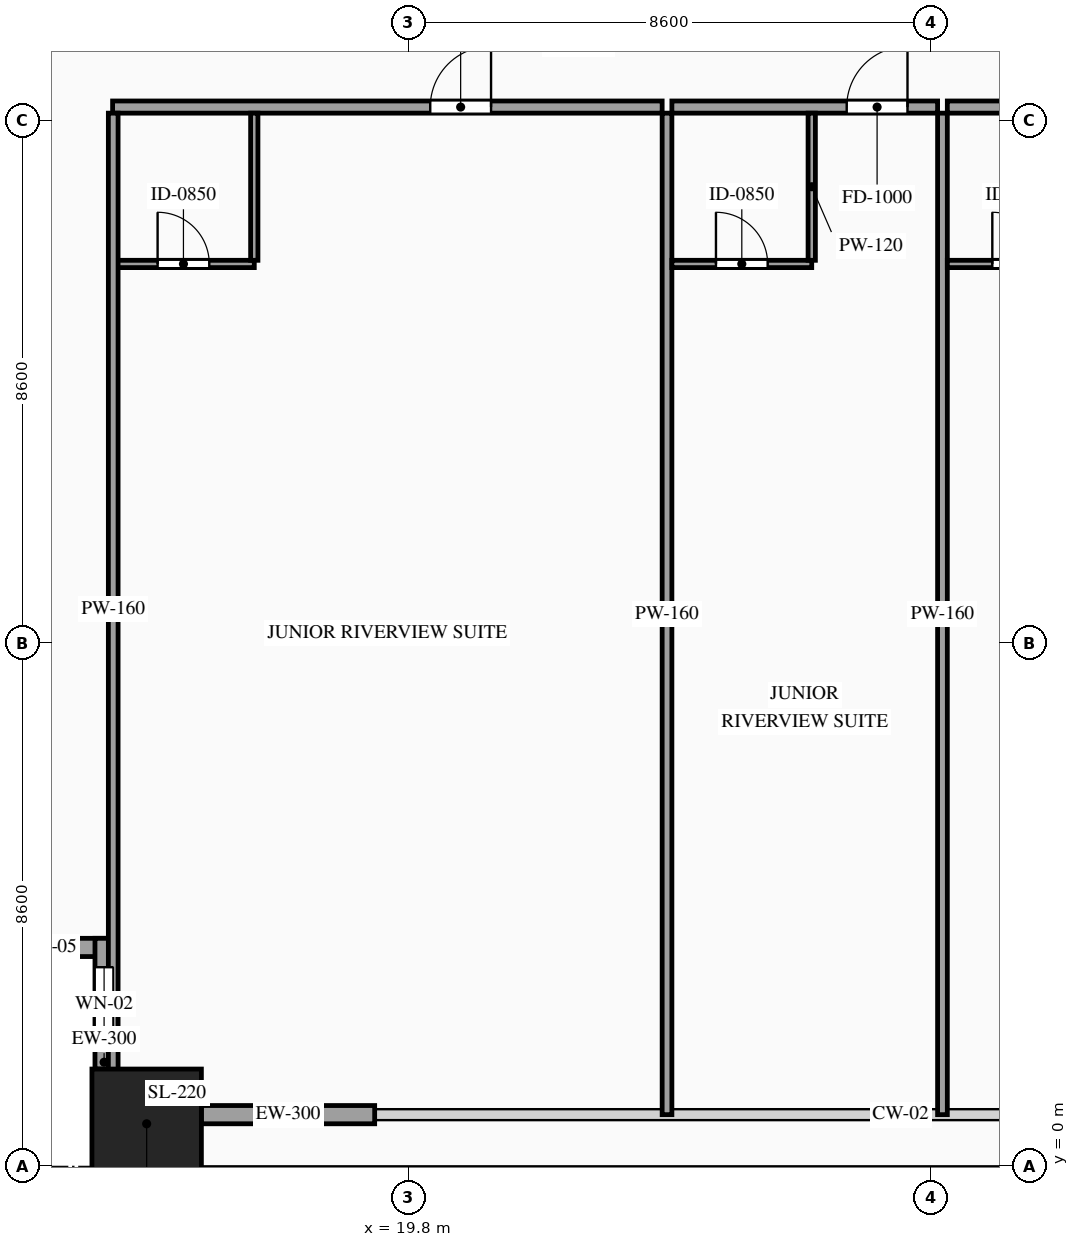
"""IFC4 building model, lengths in metres.
Left out: names, types, materials, properties, quantities, classifications, styles, units other than length and angle.
Written with IfcOpenShell. Run it as: python <this file> out.ifc"""

import sys

from ifc_helpers import new_model, si_unit, direction, frame, frame_2d, origin, origin_2d, place, context, subcontext, project, spatial, rectangle, hollow_rectangle, extrude, source, transform, mapped, element, fill, save


model = new_model("IFC4")
c1 = context("Model", 3, precision=1e-05, world=origin(), true_north=direction((0.0, 1.0)))
c2 = subcontext(c1, "Body", "Model", "MODEL_VIEW")
j1 = project(units=[si_unit("LENGTHUNIT", "METRE"), si_unit("PLANEANGLEUNIT", "RADIAN")], contexts=[c1])
p1 = place(None, origin())
s1 = spatial("IfcSite", under=j1, at=p1, CompositionType="ELEMENT")
p2 = place(p1, origin())
s2 = spatial("IfcBuilding", under=s1, at=p2, CompositionType="ELEMENT")
p3 = place(p2, frame((0.0, 0.0, 74.8)))
s3 = spatial("IfcBuildingStorey", under=s2, at=p3, CompositionType="ELEMENT", Elevation=74.8)
m1 = source(origin(), c2, "Body", "SweptSolid", [
    extrude(hollow_rectangle(XDim=1.8, YDim=1.8, WallThickness=0.08, at=origin_2d()), origin(), (0.0, 0.0, 1.0), 3.6),
])
p4 = place(p3, frame((15.5, 0.7, 0.0), z_axis=(0.0, 0.0, 1.0), x_axis=(1.0, 0.0, 0.0)))
e1 = element("IfcColumn", 1, at=p4, inside=s3, PredefinedType="COLUMN", context=c2, shape_type="MappedRepresentation", body=[
    mapped(m1, transform((0.0, 0.0, 0.0), scale=1.0)),
])
p5 = place(p3, frame((12.8, 3.6, 0.0), z_axis=(0.0, 0.0, 1.0), x_axis=(1.0, 0.0, 0.0)))
e2 = element("IfcWall", 2, at=p5, inside=s3, PredefinedType="SOLIDWALL", context=c2, shape_type="SweptSolid", body=[
    extrude(rectangle(XDim=2.15, YDim=0.3, at=frame_2d((1.075, 0.0))), origin(), (0.0, 0.0, 1.0), 3.38),
])
p6 = place(p5, frame((0.625, 0.0, 0.85)))
e3 = element("IfcOpeningElement", 3, at=p6, cuts=e2, PredefinedType="OPENING", context=c2, shape_type="SweptSolid", body=[
    extrude(rectangle(XDim=0.9, YDim=1.5, at=frame_2d((0.45, 0.75))), frame((0.0, 0.165, 0.0), z_axis=(0.0, -1.0, 0.0), x_axis=(1.0, 0.0, 0.0)), (0.0, 0.0, 1.0), 0.33),
])
p7 = place(p3, frame((14.8, 3.75, 0.0), z_axis=(0.0, 0.0, 1.0), x_axis=(0.0, -1.0, 0.0)))
e4 = element("IfcWall", 4, at=p7, inside=s3, PredefinedType="SOLIDWALL", context=c2, shape_type="SweptSolid", body=[
    extrude(rectangle(XDim=2.15, YDim=0.3, at=frame_2d((1.075, 0.0))), origin(), (0.0, 0.0, 1.0), 3.38),
])
p8 = place(p7, frame((0.475, 0.0, 0.85)))
e5 = element("IfcOpeningElement", 5, at=p8, cuts=e4, PredefinedType="OPENING", context=c2, shape_type="SweptSolid", body=[
    extrude(rectangle(XDim=1.2, YDim=2.1, at=frame_2d((0.6, 1.05))), frame((0.0, 0.165, 0.0), z_axis=(0.0, -1.0, 0.0), x_axis=(1.0, 0.0, 0.0)), (0.0, 0.0, 1.0), 0.33),
])
m2 = source(origin(), c2, "Body", "SweptSolid", [
    extrude(rectangle(XDim=2.85, YDim=0.3, at=frame_2d((1.425, 0.0))), origin(), (0.0, 0.0, 1.0), 2.775),
])
p9 = place(p3, frame((16.4, 0.85, 0.0), z_axis=(0.0, 0.0, 1.0), x_axis=(1.0, 0.0, 0.0)))
e6 = element("IfcWall", 6, at=p9, inside=s3, PredefinedType="SOLIDWALL", context=c2, shape_type="MappedRepresentation", body=[
    mapped(m2, transform((0.0, 0.0, 0.0), scale=1.0)),
])
p10 = place(p3, frame((14.94, 17.42, 0.0), z_axis=(0.0, 0.0, 1.0), x_axis=(1.0, 0.0, 0.0)))
e7 = element("IfcWall", 7, at=p10, inside=s3, PredefinedType="PARTITIONING", context=c2, shape_type="SweptSolid", body=[
    extrude(rectangle(XDim=9.038, YDim=0.2, at=frame_2d((4.519, 0.0))), origin(), (0.0, 0.0, 1.0), 3.38),
])
p11 = place(p10, frame((5.224, 0.0, 0.0)))
e8 = element("IfcOpeningElement", 8, at=p11, cuts=e7, PredefinedType="OPENING", context=c2, shape_type="SweptSolid", body=[
    extrude(rectangle(XDim=1.0, YDim=2.2, at=frame_2d((0.5, 1.1))), frame((0.0, 0.115, 0.0), z_axis=(0.0, -1.0, 0.0), x_axis=(1.0, 0.0, 0.0)), (0.0, 0.0, 1.0), 0.23),
])
m3 = source(origin(), c2, "Body", "SweptSolid", [
    extrude(rectangle(XDim=16.47, YDim=0.16, at=frame_2d((8.235, 0.0))), origin(), (0.0, 0.0, 1.0), 3.38),
])
p12 = place(p3, frame((24.058, 0.85, 0.0), z_axis=(0.0, 0.0, 1.0), x_axis=(0.0, 1.0, 0.0)))
e9 = element("IfcWall", 9, at=p12, inside=s3, PredefinedType="PARTITIONING", context=c2, shape_type="MappedRepresentation", body=[
    mapped(m3, transform((0.0, 0.0, 0.0), scale=1.0)),
])
p13 = place(p3, frame((14.94, 14.84, 0.0), z_axis=(0.0, 0.0, 1.0), x_axis=(1.0, 0.0, 0.0)))
e10 = element("IfcWall", 10, at=p13, inside=s3, PredefinedType="PARTITIONING", context=c2, shape_type="SweptSolid", body=[
    extrude(rectangle(XDim=2.33, YDim=0.12, at=frame_2d((1.165, 0.0))), origin(), (0.0, 0.0, 1.0), 3.38),
])
p14 = place(p13, frame((0.74, 0.0, 0.0)))
e11 = element("IfcOpeningElement", 11, at=p14, cuts=e10, PredefinedType="OPENING", context=c2, shape_type="SweptSolid", body=[
    extrude(rectangle(XDim=0.85, YDim=2.1, at=frame_2d((0.425, 1.05))), frame((0.0, 0.075, 0.0), z_axis=(0.0, -1.0, 0.0), x_axis=(1.0, 0.0, 0.0)), (0.0, 0.0, 1.0), 0.15),
])
m4 = source(origin(), c2, "Body", "SweptSolid", [
    extrude(rectangle(XDim=2.42, YDim=0.12, at=frame_2d((1.21, 0.0))), origin(), (0.0, 0.0, 1.0), 3.38),
])
p15 = place(p3, frame((17.27, 14.9, 0.0), z_axis=(0.0, 0.0, 1.0), x_axis=(0.0, 1.0, 0.0)))
e12 = element("IfcWall", 12, at=p15, inside=s3, PredefinedType="PARTITIONING", context=c2, shape_type="MappedRepresentation", body=[
    mapped(m4, transform((0.0, 0.0, 0.0), scale=1.0)),
])
p16 = place(p3, frame((24.138, 17.42, 0.0), z_axis=(0.0, 0.0, 1.0), x_axis=(1.0, 0.0, 0.0)))
e13 = element("IfcWall", 13, at=p16, inside=s3, PredefinedType="PARTITIONING", context=c2, shape_type="SweptSolid", body=[
    extrude(rectangle(XDim=4.37, YDim=0.2, at=frame_2d((2.185, 0.0))), origin(), (0.0, 0.0, 1.0), 3.38),
])
p17 = place(p16, frame((2.875, 0.0, 0.0)))
e14 = element("IfcOpeningElement", 14, at=p17, cuts=e13, PredefinedType="OPENING", context=c2, shape_type="SweptSolid", body=[
    extrude(rectangle(XDim=1.0, YDim=2.2, at=frame_2d((0.5, 1.1))), frame((0.0, 0.115, 0.0), z_axis=(0.0, -1.0, 0.0), x_axis=(1.0, 0.0, 0.0)), (0.0, 0.0, 1.0), 0.23),
])
p18 = place(p3, frame((28.588, 0.85, 0.0), z_axis=(0.0, 0.0, 1.0), x_axis=(0.0, 1.0, 0.0)))
e15 = element("IfcWall", 15, at=p18, inside=s3, PredefinedType="PARTITIONING", context=c2, shape_type="MappedRepresentation", body=[
    mapped(m3, transform((0.0, 0.0, 0.0), scale=1.0)),
])
p19 = place(p3, frame((24.138, 14.84, 0.0), z_axis=(0.0, 0.0, 1.0), x_axis=(1.0, 0.0, 0.0)))
e16 = element("IfcWall", 16, at=p19, inside=s3, PredefinedType="PARTITIONING", context=c2, shape_type="SweptSolid", body=[
    extrude(rectangle(XDim=2.3, YDim=0.12, at=frame_2d((1.15, 0.0))), origin(), (0.0, 0.0, 1.0), 3.38),
])
p20 = place(p19, frame((0.725, 0.0, 0.0)))
e17 = element("IfcOpeningElement", 17, at=p20, cuts=e16, PredefinedType="OPENING", context=c2, shape_type="SweptSolid", body=[
    extrude(rectangle(XDim=0.85, YDim=2.1, at=frame_2d((0.425, 1.05))), frame((0.0, 0.075, 0.0), z_axis=(0.0, -1.0, 0.0), x_axis=(1.0, 0.0, 0.0)), (0.0, 0.0, 1.0), 0.15),
])
p21 = place(p3, frame((26.438, 14.9, 0.0), z_axis=(0.0, 0.0, 1.0), x_axis=(0.0, 1.0, 0.0)))
e18 = element("IfcWall", 18, at=p21, inside=s3, PredefinedType="PARTITIONING", context=c2, shape_type="MappedRepresentation", body=[
    mapped(m4, transform((0.0, 0.0, 0.0), scale=1.0)),
])
p22 = place(p3, frame((28.668, 17.42, 0.0), z_axis=(0.0, 0.0, 1.0), x_axis=(1.0, 0.0, 0.0)))
e19 = element("IfcWall", 19, at=p22, inside=s3, PredefinedType="PARTITIONING", context=c2, shape_type="SweptSolid", body=[
    extrude(rectangle(XDim=10.017, YDim=0.2, at=frame_2d((5.009, 0.0))), origin(), (0.0, 0.0, 1.0), 3.38),
])
p23 = place(p22, frame((5.714, 0.0, 0.0)))
e20 = element("IfcOpeningElement", 20, at=p23, cuts=e19, PredefinedType="OPENING", context=c2, shape_type="SweptSolid", body=[
    extrude(rectangle(XDim=1.0, YDim=2.2, at=frame_2d((0.5, 1.1))), frame((0.0, 0.115, 0.0), z_axis=(0.0, -1.0, 0.0), x_axis=(1.0, 0.0, 0.0)), (0.0, 0.0, 1.0), 0.23),
])
p24 = place(p3, frame((28.668, 14.84, 0.0), z_axis=(0.0, 0.0, 1.0), x_axis=(1.0, 0.0, 0.0)))
e21 = element("IfcWall", 21, at=p24, inside=s3, PredefinedType="PARTITIONING", context=c2, shape_type="SweptSolid", body=[
    extrude(rectangle(XDim=2.33, YDim=0.12, at=frame_2d((1.165, 0.0))), origin(), (0.0, 0.0, 1.0), 3.38),
])
p25 = place(p24, frame((0.74, 0.0, 0.0)))
e22 = element("IfcOpeningElement", 22, at=p25, cuts=e21, PredefinedType="OPENING", context=c2, shape_type="SweptSolid", body=[
    extrude(rectangle(XDim=0.85, YDim=2.1, at=frame_2d((0.425, 1.05))), frame((0.0, 0.075, 0.0), z_axis=(0.0, -1.0, 0.0), x_axis=(1.0, 0.0, 0.0)), (0.0, 0.0, 1.0), 0.15),
])
m5 = source(origin(), c2, "Body", "SweptSolid", [
    extrude(rectangle(XDim=16.32, YDim=0.16, at=frame_2d((8.16, 0.0))), origin(), (0.0, 0.0, 1.0), 3.38),
])
p26 = place(p3, frame((14.95, 1.0, 0.0), z_axis=(0.0, 0.0, 1.0), x_axis=(0.0, 1.0, 0.0)))
e23 = element("IfcWall", 23, at=p26, inside=s3, PredefinedType="PARTITIONING", context=c2, shape_type="MappedRepresentation", body=[
    mapped(m5, transform((0.0, 0.0, 0.0), scale=1.0)),
])
m6 = source(origin(), c2, "Body", "SweptSolid", [
    extrude(rectangle(XDim=0.9, YDim=1.5, at=frame_2d((0.45, 0.75))), frame((0.0, 0.03, 0.0), z_axis=(0.0, -1.0, 0.0), x_axis=(1.0, 0.0, 0.0)), (0.0, 0.0, 1.0), 0.06),
])
p27 = place(p6, origin())
e24 = element("IfcWindow", 24, at=p27, inside=s3, PartitioningType="SINGLE_PANEL", PredefinedType="WINDOW", context=c2, shape_type="MappedRepresentation", body=[
    mapped(m6, transform((0.0, 0.0, 0.0), scale=1.0)),
])
fill(e3, e24)
m7 = source(origin(), c2, "Body", "SweptSolid", [
    extrude(rectangle(XDim=1.2, YDim=2.1, at=frame_2d((0.6, 1.05))), frame((0.0, 0.03, 0.0), z_axis=(0.0, -1.0, 0.0), x_axis=(1.0, 0.0, 0.0)), (0.0, 0.0, 1.0), 0.06),
])
p28 = place(p8, origin())
e25 = element("IfcWindow", 25, at=p28, inside=s3, PartitioningType="SINGLE_PANEL", PredefinedType="WINDOW", context=c2, shape_type="MappedRepresentation", body=[
    mapped(m7, transform((0.0, 0.0, 0.0), scale=1.0)),
])
fill(e5, e25)
m8 = source(origin(), c2, "Body", "SweptSolid", [
    extrude(rectangle(XDim=1.0, YDim=2.2, at=frame_2d((0.5, 1.1))), frame((0.0, 0.025, 0.0), z_axis=(0.0, -1.0, 0.0), x_axis=(1.0, 0.0, 0.0)), (0.0, 0.0, 1.0), 0.05),
])
p29 = place(p11, origin())
e26 = element("IfcDoor", 26, at=p29, inside=s3, OperationType="SINGLE_SWING_RIGHT", PredefinedType="DOOR", context=c2, shape_type="MappedRepresentation", body=[
    mapped(m8, transform((0.0, 0.0, 0.0), scale=1.0)),
])
fill(e8, e26)
m9 = source(origin(), c2, "Body", "SweptSolid", [
    extrude(rectangle(XDim=0.85, YDim=2.1, at=frame_2d((0.425, 1.05))), frame((0.0, 0.025, 0.0), z_axis=(0.0, -1.0, 0.0), x_axis=(1.0, 0.0, 0.0)), (0.0, 0.0, 1.0), 0.05),
])
p30 = place(p14, origin())
e27 = element("IfcDoor", 27, at=p30, inside=s3, OperationType="SINGLE_SWING_LEFT", PredefinedType="DOOR", context=c2, shape_type="MappedRepresentation", body=[
    mapped(m9, transform((0.0, 0.0, 0.0), scale=1.0)),
])
fill(e11, e27)
p31 = place(p17, origin())
e28 = element("IfcDoor", 28, at=p31, inside=s3, OperationType="SINGLE_SWING_RIGHT", PredefinedType="DOOR", context=c2, shape_type="MappedRepresentation", body=[
    mapped(m8, transform((0.0, 0.0, 0.0), scale=1.0)),
])
fill(e14, e28)
p32 = place(p20, origin())
e29 = element("IfcDoor", 29, at=p32, inside=s3, OperationType="SINGLE_SWING_LEFT", PredefinedType="DOOR", context=c2, shape_type="MappedRepresentation", body=[
    mapped(m9, transform((0.0, 0.0, 0.0), scale=1.0)),
])
fill(e17, e29)
p33 = place(p25, origin())
e30 = element("IfcDoor", 30, at=p33, inside=s3, OperationType="SINGLE_SWING_LEFT", PredefinedType="DOOR", context=c2, shape_type="MappedRepresentation", body=[
    mapped(m9, transform((0.0, 0.0, 0.0), scale=1.0)),
])
fill(e22, e30)
save(model, sys.argv[1])
